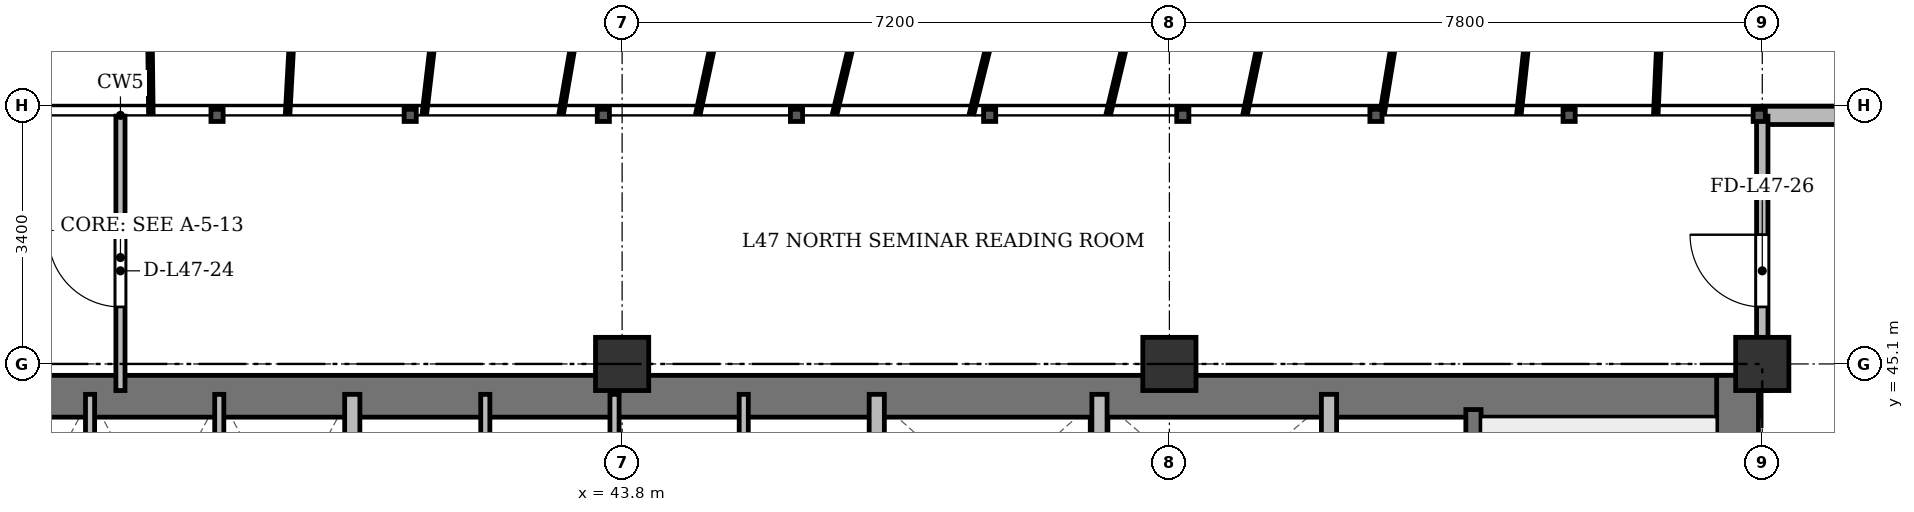
"""IFC4 building model, lengths in metres.
Left out: names, types, materials, properties, quantities, classifications, styles, units other than length and angle.
Written with IfcOpenShell. Run it as: python <this file> out.ifc"""

import sys

from ifc_helpers import new_model, si_unit, direction, frame, frame_2d, origin, origin_2d, place, context, subcontext, project, spatial, rectangle, extrude, source, transform, mapped, element, fill, save


model = new_model("IFC4")
c1 = context("Model", 3, precision=1e-05, world=origin(), true_north=direction((0.0, 1.0)))
c2 = subcontext(c1, "Body", "Model", "MODEL_VIEW")
j1 = project(units=[si_unit("LENGTHUNIT", "METRE"), si_unit("PLANEANGLEUNIT", "RADIAN")], contexts=[c1])
p1 = place(None, origin())
s1 = spatial("IfcSite", under=j1, at=p1, CompositionType="ELEMENT")
p2 = place(p1, origin())
s2 = spatial("IfcBuilding", under=s1, at=p2, CompositionType="ELEMENT")
p3 = place(p2, frame((0.0, 0.0, 178.9)))
s3 = spatial("IfcBuildingStorey", under=s2, at=p3, CompositionType="ELEMENT", Elevation=178.9)
m1 = source(origin(), c2, "Body", "SweptSolid", [
    extrude(rectangle(XDim=0.7, YDim=0.7, at=origin_2d()), origin(), (0.0, 0.0, 1.0), 3.6),
])
for number, where, z_axis, x_axis in (
    (1, (43.8, 45.1, 0.0), (0.0, 0.0, 1.0), (1.0, 0.0, 0.0)),
    (2, (51.0, 45.1, 0.0), (0.0, 0.0, 1.0), (1.0, 0.0, 0.0)),
    (3, (58.8, 45.1, 0.0), (0.0, 0.0, 1.0), (1.0, 0.0, 0.0)),
):
    element("IfcColumn", number, at=place(p3, frame(where, z_axis=z_axis, x_axis=x_axis)), inside=s3, PredefinedType="COLUMN", context=c2, shape_type="MappedRepresentation", body=[
        mapped(m1, transform((0.0, 0.0, 0.0), x_axis=(1.0, 0.0, 0.0), y_axis=(0.0, 1.0, 0.0), z_axis=(0.0, 0.0, 1.0), scale=1.0)),
    ])
p4 = place(p3, frame((58.8, 48.37, 0.0), z_axis=(0.0, 0.0, 1.0), x_axis=(1.0, 0.0, 0.0)))
e4 = element("IfcWall", 4, at=p4, inside=s3, PredefinedType="SOLIDWALL", context=c2, shape_type="SweptSolid", body=[
    extrude(rectangle(XDim=4.7, YDim=0.24, at=frame_2d((2.35, 0.0))), origin(), (0.0, 0.0, 1.0), 3.22),
])
p5 = place(p4, frame((1.675, 0.0, 0.9)))
e5 = element("IfcOpeningElement", 5, at=p5, cuts=e4, PredefinedType="OPENING", context=c2, shape_type="SweptSolid", body=[
    extrude(rectangle(XDim=1.35, YDim=1.5, at=frame_2d((0.675, 0.75))), frame((0.0, 0.13, 0.0), z_axis=(0.0, -1.0, 0.0), x_axis=(1.0, 0.0, 0.0)), (0.0, 0.0, 1.0), 0.26),
])
p6 = place(p3, frame((15.65, 44.675, 0.0), z_axis=(0.0, 0.0, 1.0), x_axis=(1.0, 0.0, 0.0)))
e6 = element("IfcWall", 6, at=p6, inside=s3, PredefinedType="SHEAR", context=c2, shape_type="SweptSolid", body=[
    extrude(rectangle(XDim=43.1, YDim=0.55, at=frame_2d((21.55, 0.0))), origin(), (0.0, 0.0, 1.0), 3.22),
])
p7 = place(p3, frame((58.475, 33.4, 0.0), z_axis=(0.0, 0.0, 1.0), x_axis=(0.0, 1.0, 0.0)))
e7 = element("IfcWall", 7, at=p7, inside=s3, PredefinedType="SHEAR", context=c2, shape_type="SweptSolid", body=[
    extrude(rectangle(XDim=11.55, YDim=0.55, at=frame_2d((5.775, 0.0))), origin(), (0.0, 0.0, 1.0), 3.22),
])
p8 = place(p3, frame((55.0, 33.4, 0.0), z_axis=(0.0, 0.0, 1.0), x_axis=(0.0, 1.0, 0.0)))
e8 = element("IfcWall", 8, at=p8, inside=s3, PredefinedType="SHEAR", context=c2, shape_type="SweptSolid", body=[
    extrude(rectangle(XDim=11.1, YDim=0.2, at=frame_2d((5.55, 0.0))), origin(), (0.0, 0.0, 1.0), 3.22),
])
p9 = place(p8, frame((0.85, 0.0, 0.0)))
e9 = element("IfcOpeningElement", 9, at=p9, cuts=e8, PredefinedType="OPENING", context=c2, shape_type="SweptSolid", body=[
    extrude(rectangle(XDim=1.1, YDim=2.15, at=frame_2d((0.55, 1.075))), frame((0.0, 0.11, 0.0), z_axis=(0.0, -1.0, 0.0), x_axis=(1.0, 0.0, 0.0)), (0.0, 0.0, 1.0), 0.22),
])
for number, where, z_axis, x_axis in (
    (10, (36.8, 41.5, 0.0), (0.0, 0.0, 1.0), (0.0, 1.0, 0.0)),
    (11, (38.5, 41.5, 0.0), (0.0, 0.0, 1.0), (0.0, 1.0, 0.0)),
):
    element("IfcWall", number, at=place(p3, frame(where, z_axis=z_axis, x_axis=x_axis)), inside=s3, PredefinedType="PARTITIONING", context=c2, shape_type="SweptSolid", body=[
        extrude(rectangle(XDim=3.2, YDim=0.12, at=frame_2d((1.6, 0.0))), origin(), (0.0, 0.0, 1.0), 3.22),
    ])
p10 = place(p3, frame((40.25, 41.5, 0.0), z_axis=(0.0, 0.0, 1.0), x_axis=(0.0, 1.0, 0.0)))
e12 = element("IfcWall", 12, at=p10, inside=s3, PredefinedType="SOLIDWALL", context=c2, shape_type="SweptSolid", body=[
    extrude(rectangle(XDim=3.2, YDim=0.2, at=frame_2d((1.6, 0.0))), origin(), (0.0, 0.0, 1.0), 3.22),
])
p11 = place(p3, frame((42.0, 41.5, 0.0), z_axis=(0.0, 0.0, 1.0), x_axis=(0.0, 1.0, 0.0)))
e13 = element("IfcWall", 13, at=p11, inside=s3, PredefinedType="PARTITIONING", context=c2, shape_type="SweptSolid", body=[
    extrude(rectangle(XDim=3.2, YDim=0.12, at=frame_2d((1.6, 0.0))), origin(), (0.0, 0.0, 1.0), 3.22),
])
p12 = place(p3, frame((43.7, 41.5, 0.0), z_axis=(0.0, 0.0, 1.0), x_axis=(0.0, 1.0, 0.0)))
e14 = element("IfcWall", 14, at=p12, inside=s3, PredefinedType="PARTITIONING", context=c2, shape_type="SweptSolid", body=[
    extrude(rectangle(XDim=3.2, YDim=0.12, at=frame_2d((1.6, 0.0))), origin(), (0.0, 0.0, 1.0), 2.72),
])
p13 = place(p3, frame((45.4, 41.5, 0.0), z_axis=(0.0, 0.0, 1.0), x_axis=(0.0, 1.0, 0.0)))
e15 = element("IfcWall", 15, at=p13, inside=s3, PredefinedType="PARTITIONING", context=c2, shape_type="SweptSolid", body=[
    extrude(rectangle(XDim=3.2, YDim=0.12, at=frame_2d((1.6, 0.0))), origin(), (0.0, 0.0, 1.0), 3.22),
])
p14 = place(p3, frame((47.15, 33.4, 0.0), z_axis=(0.0, 0.0, 1.0), x_axis=(0.0, 1.0, 0.0)))
e16 = element("IfcWall", 16, at=p14, inside=s3, PredefinedType="SOLIDWALL", context=c2, shape_type="SweptSolid", body=[
    extrude(rectangle(XDim=11.3, YDim=0.2, at=frame_2d((5.65, 0.0))), origin(), (0.0, 0.0, 1.0), 2.62),
])
for number, where, z_axis, x_axis in (
    (17, (50.08, 42.05, 0.0), (0.0, 0.0, 1.0), (0.0, 1.0, 0.0)),
    (18, (53.1, 42.05, 0.0), (0.0, 0.0, 1.0), (0.0, 1.0, 0.0)),
):
    element("IfcWall", number, at=place(p3, frame(where, z_axis=z_axis, x_axis=x_axis)), inside=s3, PredefinedType="SOLIDWALL", context=c2, shape_type="SweptSolid", body=[
        extrude(rectangle(XDim=2.65, YDim=0.2, at=frame_2d((1.325, 0.0))), origin(), (0.0, 0.0, 1.0), 3.22),
    ])
p15 = place(p3, frame((37.2, 44.75, 0.0), z_axis=(0.0, 0.0, 1.0), x_axis=(0.0, 1.0, 0.0)))
e19 = element("IfcWall", 19, at=p15, inside=s3, PredefinedType="PARTITIONING", context=c2, shape_type="SweptSolid", body=[
    extrude(rectangle(XDim=3.61, YDim=0.12, at=frame_2d((1.805, 0.0))), origin(), (0.0, 0.0, 1.0), 2.62),
])
p16 = place(p15, frame((1.1, 0.0, 0.0)))
e20 = element("IfcOpeningElement", 20, at=p16, cuts=e19, PredefinedType="OPENING", context=c2, shape_type="SweptSolid", body=[
    extrude(rectangle(XDim=0.95, YDim=2.15, at=frame_2d((0.475, 1.075))), frame((0.0, 0.07, 0.0), z_axis=(0.0, -1.0, 0.0), x_axis=(1.0, 0.0, 0.0)), (0.0, 0.0, 1.0), 0.14),
])
p17 = place(p3, frame((58.8, 44.75, 0.0), z_axis=(0.0, 0.0, 1.0), x_axis=(0.0, 1.0, 0.0)))
e21 = element("IfcWall", 21, at=p17, inside=s3, PredefinedType="PARTITIONING", context=c2, shape_type="SweptSolid", body=[
    extrude(rectangle(XDim=3.61, YDim=0.15, at=frame_2d((1.805, 0.0))), origin(), (0.0, 0.0, 1.0), 2.72),
])
p18 = place(p17, frame((1.1, 0.0, 0.0)))
e22 = element("IfcOpeningElement", 22, at=p18, cuts=e21, PredefinedType="OPENING", context=c2, shape_type="SweptSolid", body=[
    extrude(rectangle(XDim=0.95, YDim=2.15, at=frame_2d((0.475, 1.075))), frame((0.0, 0.085, 0.0), z_axis=(0.0, -1.0, 0.0), x_axis=(1.0, 0.0, 0.0)), (0.0, 0.0, 1.0), 0.17),
])
m2 = source(origin(), c2, "Body", "SweptSolid", [
    extrude(rectangle(XDim=0.95, YDim=2.15, at=frame_2d((0.475, 1.075))), frame((0.0, 0.025, 0.0), z_axis=(0.0, -1.0, 0.0), x_axis=(1.0, 0.0, 0.0)), (0.0, 0.0, 1.0), 0.05),
])
p19 = place(p16, origin())
e23 = element("IfcDoor", 23, at=p19, inside=s3, OperationType="SINGLE_SWING_RIGHT", PredefinedType="DOOR", context=c2, shape_type="MappedRepresentation", body=[
    mapped(m2, transform((0.0, 0.0, 0.0), x_axis=(1.0, 0.0, 0.0), y_axis=(0.0, 1.0, 0.0), z_axis=(0.0, 0.0, 1.0), scale=1.0)),
])
fill(e20, e23)
p20 = place(p18, origin())
e24 = element("IfcDoor", 24, at=p20, inside=s3, OperationType="SINGLE_SWING_RIGHT", PredefinedType="DOOR", context=c2, shape_type="MappedRepresentation", body=[
    mapped(m2, transform((0.0, 0.0, 0.0), x_axis=(1.0, 0.0, 0.0), y_axis=(0.0, 1.0, 0.0), z_axis=(0.0, 0.0, 1.0), scale=1.0)),
])
fill(e22, e24)
save(model, sys.argv[1])
